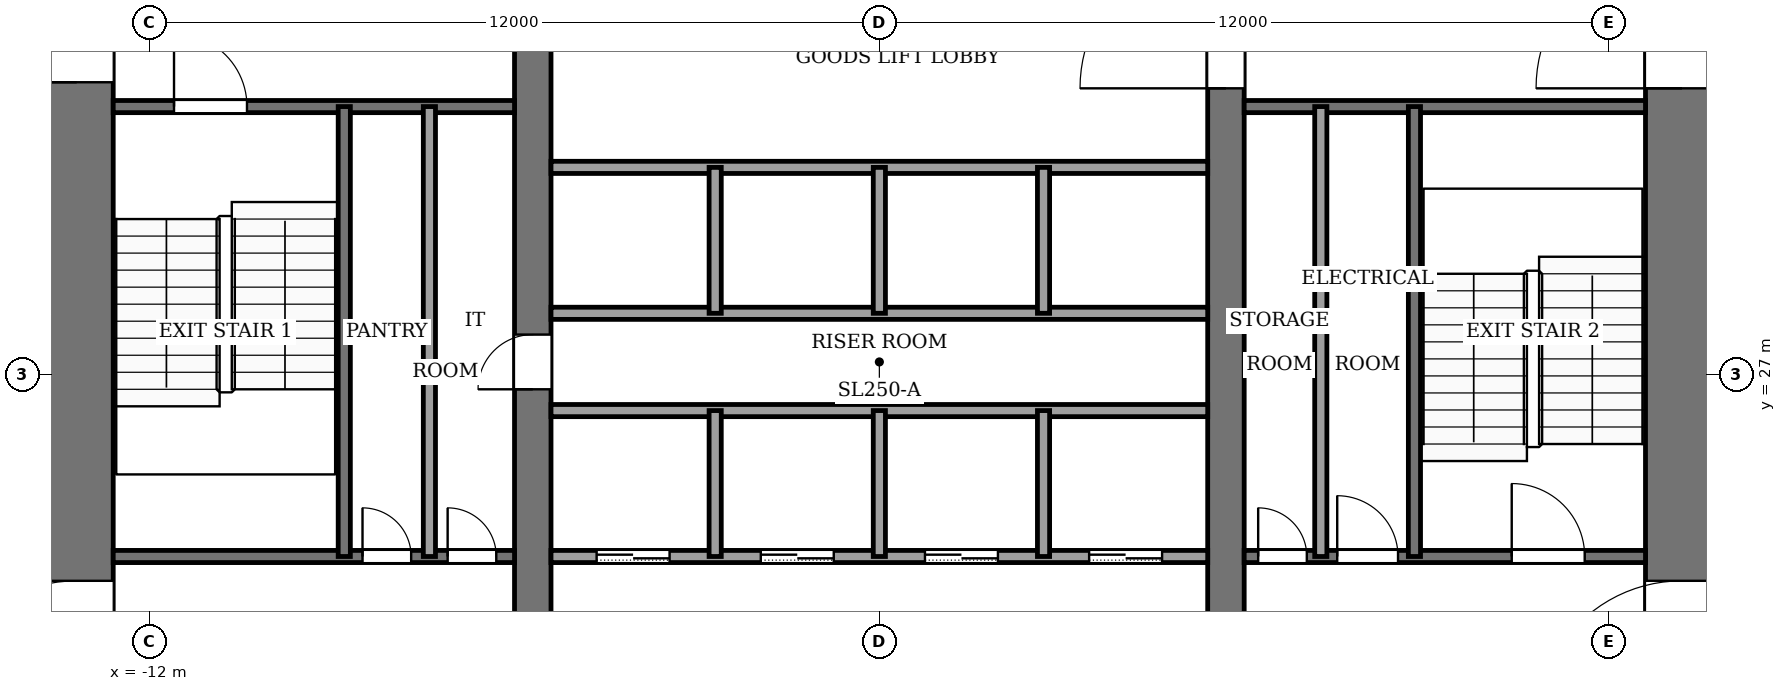
"""IFC4 building model, lengths in metres.
Left out: names, types, materials, properties, quantities, classifications, styles, units other than length and angle.
Written with IfcOpenShell. Run it as: python <this file> out.ifc"""

import sys

from ifc_helpers import new_model, si_unit, direction, frame, frame_2d, origin, place, context, subcontext, project, spatial, rectangle, extrude, element, fill, save


model = new_model("IFC4")
c1 = context("Model", 3, precision=1e-05, world=origin(), true_north=direction((0.0, 1.0)))
c2 = subcontext(c1, "Body", "Model", "MODEL_VIEW")
j1 = project(units=[si_unit("LENGTHUNIT", "METRE"), si_unit("PLANEANGLEUNIT", "RADIAN")], contexts=[c1])
p1 = place(None, origin())
s1 = spatial("IfcSite", under=j1, at=p1, CompositionType="ELEMENT")
p2 = place(p1, origin())
s2 = spatial("IfcBuilding", under=s1, at=p2, CompositionType="ELEMENT")
p3 = place(p2, frame((0.0, 0.0, 98.0)))
s3 = spatial("IfcBuildingStorey", under=s2, at=p3, CompositionType="ELEMENT", Elevation=98.0)
p4 = place(p3, frame((-13.2, 18.4, -0.13), z_axis=(0.0, 0.0, 1.0), x_axis=(0.0, 1.0, 0.0)))
e1 = element("IfcWall", 1, at=p4, inside=s3, PredefinedType="SHEAR", context=c2, shape_type="SweptSolid", body=[
    extrude(rectangle(XDim=19.2, YDim=1.2, at=frame_2d((9.6, 0.0))), origin(), (0.0, 0.0, 1.0), 4.0),
])
p5 = place(p4, frame((2.8, 0.0, 0.13)))
e2 = element("IfcOpeningElement", 2, at=p5, cuts=e1, PredefinedType="OPENING", context=c2, shape_type="SweptSolid", body=[
    extrude(rectangle(XDim=2.4, YDim=2.4, at=frame_2d((1.2, 1.2))), frame((0.0, 0.61, 0.0), z_axis=(0.0, -1.0, 0.0), x_axis=(1.0, 0.0, 0.0)), (0.0, 0.0, 1.0), 1.22),
])
p6 = place(p4, frame((13.4, 0.0, 0.13)))
e3 = element("IfcOpeningElement", 3, at=p6, cuts=e1, PredefinedType="OPENING", context=c2, shape_type="SweptSolid", body=[
    extrude(rectangle(XDim=1.4, YDim=2.2, at=frame_2d((0.7, 1.1))), frame((0.0, 0.61, 0.0), z_axis=(0.0, -1.0, 0.0), x_axis=(1.0, 0.0, 0.0)), (0.0, 0.0, 1.0), 1.22),
])
p7 = place(p3, frame((13.2, 18.4, -0.13), z_axis=(0.0, 0.0, 1.0), x_axis=(0.0, 1.0, 0.0)))
e4 = element("IfcWall", 4, at=p7, inside=s3, PredefinedType="SHEAR", context=c2, shape_type="SweptSolid", body=[
    extrude(rectangle(XDim=19.2, YDim=1.2, at=frame_2d((9.6, 0.0))), origin(), (0.0, 0.0, 1.0), 4.0),
])
p8 = place(p7, frame((2.8, 0.0, 0.13)))
e5 = element("IfcOpeningElement", 5, at=p8, cuts=e4, PredefinedType="OPENING", context=c2, shape_type="SweptSolid", body=[
    extrude(rectangle(XDim=2.4, YDim=2.4, at=frame_2d((1.2, 1.2))), frame((0.0, 0.61, 0.0), z_axis=(0.0, -1.0, 0.0), x_axis=(1.0, 0.0, 0.0)), (0.0, 0.0, 1.0), 1.22),
])
p9 = place(p7, frame((13.3, 0.0, 0.13)))
e6 = element("IfcOpeningElement", 6, at=p9, cuts=e4, PredefinedType="OPENING", context=c2, shape_type="SweptSolid", body=[
    extrude(rectangle(XDim=2.4, YDim=2.4, at=frame_2d((1.2, 1.2))), frame((0.0, 0.61, 0.0), z_axis=(0.0, -1.0, 0.0), x_axis=(1.0, 0.0, 0.0)), (0.0, 0.0, 1.0), 1.22),
])
p10 = place(p3, frame((-5.7, 18.4, -0.13), z_axis=(0.0, 0.0, 1.0), x_axis=(0.0, 1.0, 0.0)))
e7 = element("IfcWall", 7, at=p10, inside=s3, PredefinedType="SHEAR", context=c2, shape_type="SweptSolid", body=[
    extrude(rectangle(XDim=19.2, YDim=0.6, at=frame_2d((9.6, 0.0))), origin(), (0.0, 0.0, 1.0), 4.0),
])
p11 = place(p10, frame((8.35, 0.0, 0.13)))
e8 = element("IfcOpeningElement", 8, at=p11, cuts=e7, PredefinedType="OPENING", context=c2, shape_type="SweptSolid", body=[
    extrude(rectangle(XDim=0.9, YDim=2.1, at=frame_2d((0.45, 1.05))), frame((0.0, 0.31, 0.0), z_axis=(0.0, -1.0, 0.0), x_axis=(1.0, 0.0, 0.0)), (0.0, 0.0, 1.0), 0.62),
])
p12 = place(p3, frame((5.7, 18.4, -0.13), z_axis=(0.0, 0.0, 1.0), x_axis=(0.0, 1.0, 0.0)))
e9 = element("IfcWall", 9, at=p12, inside=s3, PredefinedType="SHEAR", context=c2, shape_type="SweptSolid", body=[
    extrude(rectangle(XDim=19.2, YDim=0.6, at=frame_2d((9.6, 0.0))), origin(), (0.0, 0.0, 1.0), 4.0),
])
p13 = place(p12, frame((13.3, 0.0, 0.13)))
e10 = element("IfcOpeningElement", 10, at=p13, cuts=e9, PredefinedType="OPENING", context=c2, shape_type="SweptSolid", body=[
    extrude(rectangle(XDim=2.4, YDim=2.4, at=frame_2d((1.2, 1.2))), frame((0.0, 0.31, 0.0), z_axis=(0.0, -1.0, 0.0), x_axis=(1.0, 0.0, 0.0)), (0.0, 0.0, 1.0), 0.62),
])
p14 = place(p3, frame((-12.6, 24.0, 0.0), z_axis=(0.0, 0.0, 1.0), x_axis=(1.0, 0.0, 0.0)))
e11 = element("IfcWall", 11, at=p14, inside=s3, PredefinedType="PARTITIONING", context=c2, shape_type="SweptSolid", body=[
    extrude(rectangle(XDim=6.6, YDim=0.2, at=frame_2d((3.3, 0.0))), origin(), (0.0, 0.0, 1.0), 3.87),
])
p15 = place(p14, frame((4.1, 0.0, 0.0)))
e12 = element("IfcOpeningElement", 12, at=p15, cuts=e11, PredefinedType="OPENING", context=c2, shape_type="SweptSolid", body=[
    extrude(rectangle(XDim=0.8, YDim=2.1, at=frame_2d((0.4, 1.05))), frame((0.0, 0.11, 0.0), z_axis=(0.0, -1.0, 0.0), x_axis=(1.0, 0.0, 0.0)), (0.0, 0.0, 1.0), 0.22),
])
p16 = place(p14, frame((5.5, 0.0, 0.0)))
e13 = element("IfcOpeningElement", 13, at=p16, cuts=e11, PredefinedType="OPENING", context=c2, shape_type="SweptSolid", body=[
    extrude(rectangle(XDim=0.8, YDim=2.1, at=frame_2d((0.4, 1.05))), frame((0.0, 0.11, 0.0), z_axis=(0.0, -1.0, 0.0), x_axis=(1.0, 0.0, 0.0)), (0.0, 0.0, 1.0), 0.22),
])
p17 = place(p3, frame((-5.4, 24.0, 0.0), z_axis=(0.0, 0.0, 1.0), x_axis=(1.0, 0.0, 0.0)))
e14 = element("IfcWall", 14, at=p17, inside=s3, PredefinedType="PARTITIONING", context=c2, shape_type="SweptSolid", body=[
    extrude(rectangle(XDim=10.8, YDim=0.2, at=frame_2d((5.4, 0.0))), origin(), (0.0, 0.0, 1.0), 3.87),
])
p18 = place(p17, frame((0.75, 0.0, 0.0)))
e15 = element("IfcOpeningElement", 15, at=p18, cuts=e14, PredefinedType="OPENING", context=c2, shape_type="SweptSolid", body=[
    extrude(rectangle(XDim=1.2, YDim=2.2, at=frame_2d((0.6, 1.1))), frame((0.0, 0.11, 0.0), z_axis=(0.0, -1.0, 0.0), x_axis=(1.0, 0.0, 0.0)), (0.0, 0.0, 1.0), 0.22),
])
p19 = place(p17, frame((3.45, 0.0, 0.0)))
e16 = element("IfcOpeningElement", 16, at=p19, cuts=e14, PredefinedType="OPENING", context=c2, shape_type="SweptSolid", body=[
    extrude(rectangle(XDim=1.2, YDim=2.2, at=frame_2d((0.6, 1.1))), frame((0.0, 0.11, 0.0), z_axis=(0.0, -1.0, 0.0), x_axis=(1.0, 0.0, 0.0)), (0.0, 0.0, 1.0), 0.22),
])
p20 = place(p17, frame((6.15, 0.0, 0.0)))
e17 = element("IfcOpeningElement", 17, at=p20, cuts=e14, PredefinedType="OPENING", context=c2, shape_type="SweptSolid", body=[
    extrude(rectangle(XDim=1.2, YDim=2.2, at=frame_2d((0.6, 1.1))), frame((0.0, 0.11, 0.0), z_axis=(0.0, -1.0, 0.0), x_axis=(1.0, 0.0, 0.0)), (0.0, 0.0, 1.0), 0.22),
])
p21 = place(p17, frame((8.85, 0.0, 0.0)))
e18 = element("IfcOpeningElement", 18, at=p21, cuts=e14, PredefinedType="OPENING", context=c2, shape_type="SweptSolid", body=[
    extrude(rectangle(XDim=1.2, YDim=2.2, at=frame_2d((0.6, 1.1))), frame((0.0, 0.11, 0.0), z_axis=(0.0, -1.0, 0.0), x_axis=(1.0, 0.0, 0.0)), (0.0, 0.0, 1.0), 0.22),
])
p22 = place(p3, frame((6.0, 24.0, 0.0), z_axis=(0.0, 0.0, 1.0), x_axis=(1.0, 0.0, 0.0)))
e19 = element("IfcWall", 19, at=p22, inside=s3, PredefinedType="PARTITIONING", context=c2, shape_type="SweptSolid", body=[
    extrude(rectangle(XDim=6.6, YDim=0.2, at=frame_2d((3.3, 0.0))), origin(), (0.0, 0.0, 1.0), 3.87),
])
p23 = place(p22, frame((0.23, 0.0, 0.0)))
e20 = element("IfcOpeningElement", 20, at=p23, cuts=e19, PredefinedType="OPENING", context=c2, shape_type="SweptSolid", body=[
    extrude(rectangle(XDim=0.8, YDim=2.1, at=frame_2d((0.4, 1.05))), frame((0.0, 0.11, 0.0), z_axis=(0.0, -1.0, 0.0), x_axis=(1.0, 0.0, 0.0)), (0.0, 0.0, 1.0), 0.22),
])
p24 = place(p22, frame((1.53, 0.0, 0.0)))
e21 = element("IfcOpeningElement", 21, at=p24, cuts=e19, PredefinedType="OPENING", context=c2, shape_type="SweptSolid", body=[
    extrude(rectangle(XDim=1.0, YDim=2.1, at=frame_2d((0.5, 1.05))), frame((0.0, 0.11, 0.0), z_axis=(0.0, -1.0, 0.0), x_axis=(1.0, 0.0, 0.0)), (0.0, 0.0, 1.0), 0.22),
])
p25 = place(p22, frame((4.4, 0.0, 0.0)))
e22 = element("IfcOpeningElement", 22, at=p25, cuts=e19, PredefinedType="OPENING", context=c2, shape_type="SweptSolid", body=[
    extrude(rectangle(XDim=1.2, YDim=2.2, at=frame_2d((0.6, 1.1))), frame((0.0, 0.11, 0.0), z_axis=(0.0, -1.0, 0.0), x_axis=(1.0, 0.0, 0.0)), (0.0, 0.0, 1.0), 0.22),
])
for number, where, z_axis, x_axis in (
    (23, (-5.4, 26.4, 0.0), (0.0, 0.0, 1.0), (1.0, 0.0, 0.0)),
    (24, (-5.4, 28.0, 0.0), (0.0, 0.0, 1.0), (1.0, 0.0, 0.0)),
    (25, (-5.4, 30.4, 0.0), (0.0, 0.0, 1.0), (1.0, 0.0, 0.0)),
):
    element("IfcWall", number, at=place(p3, frame(where, z_axis=z_axis, x_axis=x_axis)), inside=s3, PredefinedType="PARTITIONING", context=c2, shape_type="SweptSolid", body=[
        extrude(rectangle(XDim=10.8, YDim=0.2, at=frame_2d((5.4, 0.0))), origin(), (0.0, 0.0, 1.0), 3.87),
    ])
p26 = place(p3, frame((-12.6, 31.4, 0.0), z_axis=(0.0, 0.0, 1.0), x_axis=(1.0, 0.0, 0.0)))
e26 = element("IfcWall", 26, at=p26, inside=s3, PredefinedType="PARTITIONING", context=c2, shape_type="SweptSolid", body=[
    extrude(rectangle(XDim=6.6, YDim=0.2, at=frame_2d((3.3, 0.0))), origin(), (0.0, 0.0, 1.0), 3.87),
])
p27 = place(p26, frame((1.0, 0.0, 0.0)))
e27 = element("IfcOpeningElement", 27, at=p27, cuts=e26, PredefinedType="OPENING", context=c2, shape_type="SweptSolid", body=[
    extrude(rectangle(XDim=1.2, YDim=2.2, at=frame_2d((0.6, 1.1))), frame((0.0, 0.11, 0.0), z_axis=(0.0, -1.0, 0.0), x_axis=(1.0, 0.0, 0.0)), (0.0, 0.0, 1.0), 0.22),
])
p28 = place(p3, frame((6.0, 31.4, 0.0), z_axis=(0.0, 0.0, 1.0), x_axis=(1.0, 0.0, 0.0)))
e28 = element("IfcWall", 28, at=p28, inside=s3, PredefinedType="PARTITIONING", context=c2, shape_type="SweptSolid", body=[
    extrude(rectangle(XDim=6.6, YDim=0.2, at=frame_2d((3.3, 0.0))), origin(), (0.0, 0.0, 1.0), 3.87),
])
for number, where, z_axis, x_axis in (
    (29, (-8.8, 24.0, 0.0), (0.0, 0.0, 1.0), (0.0, 1.0, 0.0)),
    (30, (-7.4, 24.0, 0.0), (0.0, 0.0, 1.0), (0.0, 1.0, 0.0)),
):
    element("IfcWall", number, at=place(p3, frame(where, z_axis=z_axis, x_axis=x_axis)), inside=s3, PredefinedType="PARTITIONING", context=c2, shape_type="SweptSolid", body=[
        extrude(rectangle(XDim=7.4, YDim=0.2, at=frame_2d((3.7, 0.0))), origin(), (0.0, 0.0, 1.0), 3.87),
    ])
for number, where, z_axis, x_axis in (
    (31, (-2.7, 24.0, 0.0), (0.0, 0.0, 1.0), (0.0, 1.0, 0.0)),
    (32, (-2.7, 28.0, 0.0), (0.0, 0.0, 1.0), (0.0, 1.0, 0.0)),
    (33, (0.0, 24.0, 0.0), (0.0, 0.0, 1.0), (0.0, 1.0, 0.0)),
    (34, (0.0, 28.0, 0.0), (0.0, 0.0, 1.0), (0.0, 1.0, 0.0)),
    (35, (2.7, 24.0, 0.0), (0.0, 0.0, 1.0), (0.0, 1.0, 0.0)),
    (36, (2.7, 28.0, 0.0), (0.0, 0.0, 1.0), (0.0, 1.0, 0.0)),
):
    element("IfcWall", number, at=place(p3, frame(where, z_axis=z_axis, x_axis=x_axis)), inside=s3, PredefinedType="PARTITIONING", context=c2, shape_type="SweptSolid", body=[
        extrude(rectangle(XDim=2.4, YDim=0.2, at=frame_2d((1.2, 0.0))), origin(), (0.0, 0.0, 1.0), 3.87),
    ])
for number, where, z_axis, x_axis in (
    (37, (7.26, 24.0, 0.0), (0.0, 0.0, 1.0), (0.0, 1.0, 0.0)),
    (38, (8.8, 24.0, 0.0), (0.0, 0.0, 1.0), (0.0, 1.0, 0.0)),
):
    element("IfcWall", number, at=place(p3, frame(where, z_axis=z_axis, x_axis=x_axis)), inside=s3, PredefinedType="PARTITIONING", context=c2, shape_type="SweptSolid", body=[
        extrude(rectangle(XDim=7.4, YDim=0.2, at=frame_2d((3.7, 0.0))), origin(), (0.0, 0.0, 1.0), 3.87),
    ])
p29 = place(p18, origin())
e39 = element("IfcDoor", 39, at=p29, inside=s3, OperationType="SLIDING_TO_LEFT", PredefinedType="DOOR", context=c2, shape_type="SweptSolid", body=[
    extrude(rectangle(XDim=1.2, YDim=2.2, at=frame_2d((0.6, 1.1))), frame((0.0, 0.025, 0.0), z_axis=(0.0, -1.0, 0.0), x_axis=(1.0, 0.0, 0.0)), (0.0, 0.0, 1.0), 0.05),
])
fill(e15, e39)
p30 = place(p19, origin())
e40 = element("IfcDoor", 40, at=p30, inside=s3, OperationType="SLIDING_TO_LEFT", PredefinedType="DOOR", context=c2, shape_type="SweptSolid", body=[
    extrude(rectangle(XDim=1.2, YDim=2.2, at=frame_2d((0.6, 1.1))), frame((0.0, 0.025, 0.0), z_axis=(0.0, -1.0, 0.0), x_axis=(1.0, 0.0, 0.0)), (0.0, 0.0, 1.0), 0.05),
])
fill(e16, e40)
p31 = place(p20, origin())
e41 = element("IfcDoor", 41, at=p31, inside=s3, OperationType="SLIDING_TO_LEFT", PredefinedType="DOOR", context=c2, shape_type="SweptSolid", body=[
    extrude(rectangle(XDim=1.2, YDim=2.2, at=frame_2d((0.6, 1.1))), frame((0.0, 0.025, 0.0), z_axis=(0.0, -1.0, 0.0), x_axis=(1.0, 0.0, 0.0)), (0.0, 0.0, 1.0), 0.05),
])
fill(e17, e41)
p32 = place(p21, origin())
e42 = element("IfcDoor", 42, at=p32, inside=s3, OperationType="SLIDING_TO_LEFT", PredefinedType="DOOR", context=c2, shape_type="SweptSolid", body=[
    extrude(rectangle(XDim=1.2, YDim=2.2, at=frame_2d((0.6, 1.1))), frame((0.0, 0.025, 0.0), z_axis=(0.0, -1.0, 0.0), x_axis=(1.0, 0.0, 0.0)), (0.0, 0.0, 1.0), 0.05),
])
fill(e18, e42)
p33 = place(p15, origin())
e43 = element("IfcDoor", 43, at=p33, inside=s3, OperationType="SINGLE_SWING_LEFT", PredefinedType="DOOR", context=c2, shape_type="SweptSolid", body=[
    extrude(rectangle(XDim=0.8, YDim=2.1, at=frame_2d((0.4, 1.05))), frame((0.0, 0.025, 0.0), z_axis=(0.0, -1.0, 0.0), x_axis=(1.0, 0.0, 0.0)), (0.0, 0.0, 1.0), 0.05),
])
fill(e12, e43)
p34 = place(p16, origin())
e44 = element("IfcDoor", 44, at=p34, inside=s3, OperationType="SINGLE_SWING_RIGHT", PredefinedType="DOOR", context=c2, shape_type="SweptSolid", body=[
    extrude(rectangle(XDim=0.8, YDim=2.1, at=frame_2d((0.4, 1.05))), frame((0.0, 0.025, 0.0), z_axis=(0.0, -1.0, 0.0), x_axis=(1.0, 0.0, 0.0)), (0.0, 0.0, 1.0), 0.05),
])
fill(e13, e44)
p35 = place(p23, origin())
e45 = element("IfcDoor", 45, at=p35, inside=s3, OperationType="SINGLE_SWING_RIGHT", PredefinedType="DOOR", context=c2, shape_type="SweptSolid", body=[
    extrude(rectangle(XDim=0.8, YDim=2.1, at=frame_2d((0.4, 1.05))), frame((0.0, 0.025, 0.0), z_axis=(0.0, -1.0, 0.0), x_axis=(1.0, 0.0, 0.0)), (0.0, 0.0, 1.0), 0.05),
])
fill(e20, e45)
p36 = place(p24, origin())
e46 = element("IfcDoor", 46, at=p36, inside=s3, OperationType="SINGLE_SWING_LEFT", PredefinedType="DOOR", context=c2, shape_type="SweptSolid", body=[
    extrude(rectangle(XDim=1.0, YDim=2.1, at=frame_2d((0.5, 1.05))), frame((0.0, 0.025, 0.0), z_axis=(0.0, -1.0, 0.0), x_axis=(1.0, 0.0, 0.0)), (0.0, 0.0, 1.0), 0.05),
])
fill(e21, e46)
p37 = place(p11, origin())
e47 = element("IfcDoor", 47, at=p37, inside=s3, OperationType="SINGLE_SWING_RIGHT", PredefinedType="DOOR", context=c2, shape_type="SweptSolid", body=[
    extrude(rectangle(XDim=0.9, YDim=2.1, at=frame_2d((0.45, 1.05))), frame((0.0, 0.025, 0.0), z_axis=(0.0, -1.0, 0.0), x_axis=(1.0, 0.0, 0.0)), (0.0, 0.0, 1.0), 0.05),
])
fill(e8, e47)
p38 = place(p27, origin())
e48 = element("IfcDoor", 48, at=p38, inside=s3, OperationType="SINGLE_SWING_RIGHT", PredefinedType="DOOR", context=c2, shape_type="SweptSolid", body=[
    extrude(rectangle(XDim=1.2, YDim=2.2, at=frame_2d((0.6, 1.1))), frame((0.0, 0.025, 0.0), z_axis=(0.0, -1.0, 0.0), x_axis=(1.0, 0.0, 0.0)), (0.0, 0.0, 1.0), 0.05),
])
fill(e27, e48)
p39 = place(p25, origin())
e49 = element("IfcDoor", 49, at=p39, inside=s3, OperationType="SINGLE_SWING_LEFT", PredefinedType="DOOR", context=c2, shape_type="SweptSolid", body=[
    extrude(rectangle(XDim=1.2, YDim=2.2, at=frame_2d((0.6, 1.1))), frame((0.0, 0.025, 0.0), z_axis=(0.0, -1.0, 0.0), x_axis=(1.0, 0.0, 0.0)), (0.0, 0.0, 1.0), 0.05),
])
fill(e22, e49)
p40 = place(p13, origin())
e50 = element("IfcDoor", 50, at=p40, inside=s3, OperationType="DOUBLE_DOOR_SINGLE_SWING", PredefinedType="DOOR", context=c2, shape_type="SweptSolid", body=[
    extrude(rectangle(XDim=2.4, YDim=2.4, at=frame_2d((1.2, 1.2))), frame((0.0, 0.025, 0.0), z_axis=(0.0, -1.0, 0.0), x_axis=(1.0, 0.0, 0.0)), (0.0, 0.0, 1.0), 0.05),
])
fill(e10, e50)
p41 = place(p5, origin())
e51 = element("IfcDoor", 51, at=p41, inside=s3, OperationType="DOUBLE_DOOR_SINGLE_SWING", PredefinedType="DOOR", context=c2, shape_type="SweptSolid", body=[
    extrude(rectangle(XDim=2.4, YDim=2.4, at=frame_2d((1.2, 1.2))), frame((0.0, 0.025, 0.0), z_axis=(0.0, -1.0, 0.0), x_axis=(1.0, 0.0, 0.0)), (0.0, 0.0, 1.0), 0.05),
])
fill(e2, e51)
p42 = place(p8, origin())
e52 = element("IfcDoor", 52, at=p42, inside=s3, OperationType="DOUBLE_DOOR_SINGLE_SWING", PredefinedType="DOOR", context=c2, shape_type="SweptSolid", body=[
    extrude(rectangle(XDim=2.4, YDim=2.4, at=frame_2d((1.2, 1.2))), frame((0.0, 0.025, 0.0), z_axis=(0.0, -1.0, 0.0), x_axis=(1.0, 0.0, 0.0)), (0.0, 0.0, 1.0), 0.05),
])
fill(e5, e52)
p43 = place(p9, origin())
e53 = element("IfcDoor", 53, at=p43, inside=s3, OperationType="DOUBLE_DOOR_SINGLE_SWING", PredefinedType="DOOR", context=c2, shape_type="SweptSolid", body=[
    extrude(rectangle(XDim=2.4, YDim=2.4, at=frame_2d((1.2, 1.2))), frame((0.0, 0.025, 0.0), z_axis=(0.0, -1.0, 0.0), x_axis=(1.0, 0.0, 0.0)), (0.0, 0.0, 1.0), 0.05),
])
fill(e6, e53)
p44 = place(p6, origin())
e54 = element("IfcDoor", 54, at=p44, inside=s3, OperationType="SINGLE_SWING_RIGHT", PredefinedType="DOOR", context=c2, shape_type="SweptSolid", body=[
    extrude(rectangle(XDim=1.4, YDim=2.2, at=frame_2d((0.7, 1.1))), frame((0.0, 0.025, 0.0), z_axis=(0.0, -1.0, 0.0), x_axis=(1.0, 0.0, 0.0)), (0.0, 0.0, 1.0), 0.05),
])
fill(e3, e54)
save(model, sys.argv[1])
